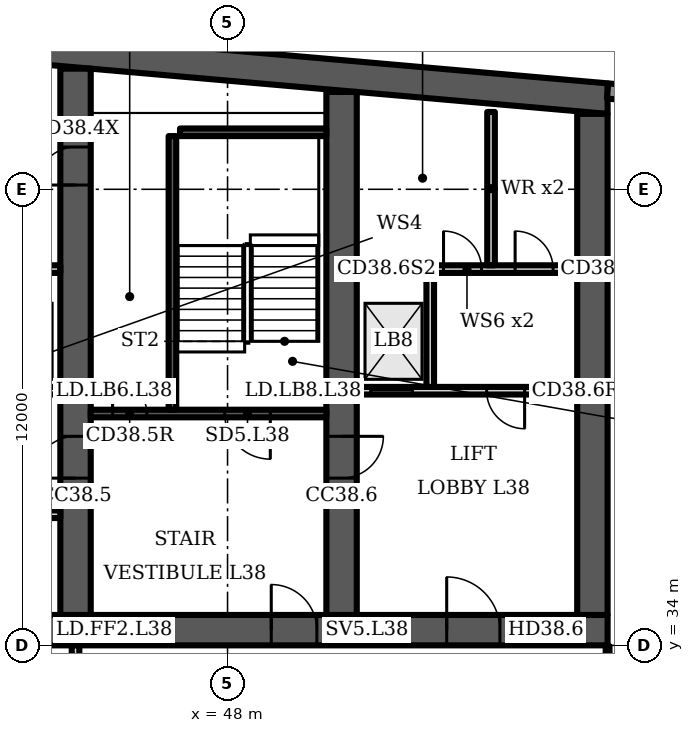
"""IFC4 building model, lengths in metres.
Left out: names, types, materials, properties, quantities, classifications, styles, units other than length and angle.
Written with IfcOpenShell. Run it as: python <this file> out.ifc"""

import sys

from ifc_helpers import new_model, si_unit, direction, frame, frame_2d, origin, place, context, subcontext, project, spatial, polyline, rectangle, outline, extrude, element, fill, save


model = new_model("IFC4")
c1 = context("Model", 3, precision=1e-05, world=origin(), true_north=direction((0.0, 1.0)))
c2 = subcontext(c1, "Body", "Model", "MODEL_VIEW")
j1 = project(units=[si_unit("LENGTHUNIT", "METRE"), si_unit("PLANEANGLEUNIT", "RADIAN")], contexts=[c1])
p1 = place(None, origin())
s1 = spatial("IfcSite", under=j1, at=p1, CompositionType="ELEMENT")
p2 = place(p1, origin())
s2 = spatial("IfcBuilding", under=s1, at=p2, CompositionType="ELEMENT")
p3 = place(p2, frame((0.0, 0.0, 159.1)))
s3 = spatial("IfcBuildingStorey", under=s2, at=p3, CompositionType="ELEMENT", Elevation=159.1)
p4 = place(p3, frame((0.0, 0.0, -0.0)))
e1 = element("IfcWall", 1, at=p4, inside=s3, PredefinedType="SHEAR", context=c2, shape_type="SweptSolid", body=[
    extrude(outline(polyline([(16.0, 47.984), (37.0, 49.822), (58.0, 47.984), (58.0, 48.787), (37.0, 50.625), (16.0, 48.787), (16.0, 47.984)])), origin(), (0.0, 0.0, 1.0), 3.6),
])
p5 = place(p3, frame((16.0, 34.4, 0.0), z_axis=(0.0, 0.0, 1.0), x_axis=(1.0, 0.0, 0.0)))
e2 = element("IfcWall", 2, at=p5, inside=s3, PredefinedType="SHEAR", context=c2, shape_type="SweptSolid", body=[
    extrude(rectangle(XDim=42.0, YDim=0.8, at=frame_2d((21.0, 0.0))), origin(), (0.0, 0.0, 1.0), 3.6),
])
p6 = place(p5, frame((3.2, 0.0, 0.0)))
e3 = element("IfcOpeningElement", 3, at=p6, cuts=e2, PredefinedType="OPENING", context=c2, shape_type="SweptSolid", body=[
    extrude(rectangle(XDim=1.0, YDim=2.1, at=frame_2d((0.5, 1.05))), frame((0.0, 0.41, 0.0), z_axis=(0.0, -1.0, 0.0), x_axis=(1.0, 0.0, 0.0)), (0.0, 0.0, 1.0), 0.82),
])
p7 = place(p5, frame((7.65, 0.0, 0.0)))
e4 = element("IfcOpeningElement", 4, at=p7, cuts=e2, PredefinedType="OPENING", context=c2, shape_type="SweptSolid", body=[
    extrude(rectangle(XDim=1.2, YDim=2.1, at=frame_2d((0.6, 1.05))), frame((0.0, 0.41, 0.0), z_axis=(0.0, -1.0, 0.0), x_axis=(1.0, 0.0, 0.0)), (0.0, 0.0, 1.0), 0.82),
])
p8 = place(p5, frame((14.767, 0.0, 0.0)))
e5 = element("IfcOpeningElement", 5, at=p8, cuts=e2, PredefinedType="OPENING", context=c2, shape_type="SweptSolid", body=[
    extrude(rectangle(XDim=1.1, YDim=2.1, at=frame_2d((0.55, 1.05))), frame((0.0, 0.41, 0.0), z_axis=(0.0, -1.0, 0.0), x_axis=(1.0, 0.0, 0.0)), (0.0, 0.0, 1.0), 0.82),
])
p9 = place(p5, frame((19.133, 0.0, 0.0)))
e6 = element("IfcOpeningElement", 6, at=p9, cuts=e2, PredefinedType="OPENING", context=c2, shape_type="SweptSolid", body=[
    extrude(rectangle(XDim=1.1, YDim=2.1, at=frame_2d((0.55, 1.05))), frame((0.0, 0.41, 0.0), z_axis=(0.0, -1.0, 0.0), x_axis=(1.0, 0.0, 0.0)), (0.0, 0.0, 1.0), 0.82),
])
p10 = place(p5, frame((16.8, 0.0, 0.0)))
e7 = element("IfcOpeningElement", 7, at=p10, cuts=e2, PredefinedType="OPENING", context=c2, shape_type="SweptSolid", body=[
    extrude(rectangle(XDim=1.4, YDim=2.1, at=frame_2d((0.7, 1.05))), frame((0.0, 0.41, 0.0), z_axis=(0.0, -1.0, 0.0), x_axis=(1.0, 0.0, 0.0)), (0.0, 0.0, 1.0), 0.82),
])
p11 = place(p5, frame((21.767, 0.0, 0.0)))
e8 = element("IfcOpeningElement", 8, at=p11, cuts=e2, PredefinedType="OPENING", context=c2, shape_type="SweptSolid", body=[
    extrude(rectangle(XDim=1.1, YDim=2.1, at=frame_2d((0.55, 1.05))), frame((0.0, 0.41, 0.0), z_axis=(0.0, -1.0, 0.0), x_axis=(1.0, 0.0, 0.0)), (0.0, 0.0, 1.0), 0.82),
])
p12 = place(p5, frame((23.95, 0.0, 0.0)))
e9 = element("IfcOpeningElement", 9, at=p12, cuts=e2, PredefinedType="OPENING", context=c2, shape_type="SweptSolid", body=[
    extrude(rectangle(XDim=1.1, YDim=2.1, at=frame_2d((0.55, 1.05))), frame((0.0, 0.41, 0.0), z_axis=(0.0, -1.0, 0.0), x_axis=(1.0, 0.0, 0.0)), (0.0, 0.0, 1.0), 0.82),
])
p13 = place(p5, frame((26.133, 0.0, 0.0)))
e10 = element("IfcOpeningElement", 10, at=p13, cuts=e2, PredefinedType="OPENING", context=c2, shape_type="SweptSolid", body=[
    extrude(rectangle(XDim=1.1, YDim=2.1, at=frame_2d((0.55, 1.05))), frame((0.0, 0.41, 0.0), z_axis=(0.0, -1.0, 0.0), x_axis=(1.0, 0.0, 0.0)), (0.0, 0.0, 1.0), 0.82),
])
p14 = place(p5, frame((33.15, 0.0, 0.0)))
e11 = element("IfcOpeningElement", 11, at=p14, cuts=e2, PredefinedType="OPENING", context=c2, shape_type="SweptSolid", body=[
    extrude(rectangle(XDim=1.2, YDim=2.1, at=frame_2d((0.6, 1.05))), frame((0.0, 0.41, 0.0), z_axis=(0.0, -1.0, 0.0), x_axis=(1.0, 0.0, 0.0)), (0.0, 0.0, 1.0), 0.82),
])
p15 = place(p5, frame((37.767, 0.0, 0.0)))
e12 = element("IfcOpeningElement", 12, at=p15, cuts=e2, PredefinedType="OPENING", context=c2, shape_type="SweptSolid", body=[
    extrude(rectangle(XDim=1.4, YDim=2.1, at=frame_2d((0.7, 1.05))), frame((0.0, 0.41, 0.0), z_axis=(0.0, -1.0, 0.0), x_axis=(1.0, 0.0, 0.0)), (0.0, 0.0, 1.0), 0.82),
])
p16 = place(p3, frame((44.0, 34.8, 0.0), z_axis=(0.0, 0.0, 1.0), x_axis=(0.0, 1.0, 0.0)))
e13 = element("IfcWall", 13, at=p16, inside=s3, PredefinedType="SHEAR", context=c2, shape_type="SweptSolid", body=[
    extrude(rectangle(XDim=14.374, YDim=0.8, at=frame_2d((7.187, 0.0))), origin(), (0.0, 0.0, 1.0), 3.6),
])
p17 = place(p16, frame((11.312, 0.0, 0.0)))
e14 = element("IfcOpeningElement", 14, at=p17, cuts=e13, PredefinedType="OPENING", context=c2, shape_type="SweptSolid", body=[
    extrude(rectangle(XDim=1.0, YDim=2.1, at=frame_2d((0.5, 1.05))), frame((0.0, 0.41, 0.0), z_axis=(0.0, -1.0, 0.0), x_axis=(1.0, 0.0, 0.0)), (0.0, 0.0, 1.0), 0.82),
])
p18 = place(p16, frame((3.6, 0.0, 0.0)))
e15 = element("IfcOpeningElement", 15, at=p18, cuts=e13, PredefinedType="OPENING", context=c2, shape_type="SweptSolid", body=[
    extrude(rectangle(XDim=1.1, YDim=2.1, at=frame_2d((0.55, 1.05))), frame((0.0, 0.41, 0.0), z_axis=(0.0, -1.0, 0.0), x_axis=(1.0, 0.0, 0.0)), (0.0, 0.0, 1.0), 0.82),
])
p19 = place(p3, frame((51.0, 34.8, 0.0), z_axis=(0.0, 0.0, 1.0), x_axis=(0.0, 1.0, 0.0)))
e16 = element("IfcWall", 16, at=p19, inside=s3, PredefinedType="SHEAR", context=c2, shape_type="SweptSolid", body=[
    extrude(rectangle(XDim=13.762, YDim=0.8, at=frame_2d((6.881, 0.0))), origin(), (0.0, 0.0, 1.0), 3.6),
])
p20 = place(p19, frame((3.6, 0.0, 0.0)))
e17 = element("IfcOpeningElement", 17, at=p20, cuts=e16, PredefinedType="OPENING", context=c2, shape_type="SweptSolid", body=[
    extrude(rectangle(XDim=1.1, YDim=2.1, at=frame_2d((0.55, 1.05))), frame((0.0, 0.41, 0.0), z_axis=(0.0, -1.0, 0.0), x_axis=(1.0, 0.0, 0.0)), (0.0, 0.0, 1.0), 0.82),
])
p21 = place(p3, frame((57.6, 34.8, 0.0), z_axis=(0.0, 0.0, 1.0), x_axis=(0.0, 1.0, 0.0)))
e18 = element("IfcWall", 18, at=p21, inside=s3, PredefinedType="SHEAR", context=c2, shape_type="SweptSolid", body=[
    extrude(rectangle(XDim=13.184, YDim=0.8, at=frame_2d((6.592, 0.0))), origin(), (0.0, 0.0, 1.0), 3.6),
])
p22 = place(p3, frame((60.983, 48.326, 0.0), z_axis=(0.0, 0.0, 1.0), x_axis=(-0.996194, 0.087168, 0.0)))
e19 = element("IfcWall", 19, at=p22, inside=s3, PredefinedType="SOLIDWALL", context=c2, shape_type="SweptSolid", body=[
    extrude(rectangle(XDim=2.994, YDim=0.4, at=frame_2d((1.497, 0.0))), origin(), (0.0, 0.0, 1.0), 3.2),
])
p23 = place(p3, frame((37.4, 40.7, 0.0), z_axis=(0.0, 0.0, 1.0), x_axis=(1.0, 0.0, 0.0)))
e20 = element("IfcWall", 20, at=p23, inside=s3, PredefinedType="PARTITIONING", context=c2, shape_type="SweptSolid", body=[
    extrude(rectangle(XDim=6.2, YDim=0.2, at=frame_2d((3.1, 0.0))), origin(), (0.0, 0.0, 1.0), 3.2),
])
p24 = place(p23, frame((0.367, 0.0, 0.0)))
e21 = element("IfcOpeningElement", 21, at=p24, cuts=e20, PredefinedType="OPENING", context=c2, shape_type="SweptSolid", body=[
    extrude(rectangle(XDim=1.1, YDim=2.1, at=frame_2d((0.55, 1.05))), frame((0.0, 0.11, 0.0), z_axis=(0.0, -1.0, 0.0), x_axis=(1.0, 0.0, 0.0)), (0.0, 0.0, 1.0), 0.22),
])
p25 = place(p23, frame((2.55, 0.0, 0.0)))
e22 = element("IfcOpeningElement", 22, at=p25, cuts=e20, PredefinedType="OPENING", context=c2, shape_type="SweptSolid", body=[
    extrude(rectangle(XDim=1.1, YDim=2.1, at=frame_2d((0.55, 1.05))), frame((0.0, 0.11, 0.0), z_axis=(0.0, -1.0, 0.0), x_axis=(1.0, 0.0, 0.0)), (0.0, 0.0, 1.0), 0.22),
])
p26 = place(p23, frame((4.733, 0.0, 0.0)))
e23 = element("IfcOpeningElement", 23, at=p26, cuts=e20, PredefinedType="OPENING", context=c2, shape_type="SweptSolid", body=[
    extrude(rectangle(XDim=1.1, YDim=2.1, at=frame_2d((0.55, 1.05))), frame((0.0, 0.11, 0.0), z_axis=(0.0, -1.0, 0.0), x_axis=(1.0, 0.0, 0.0)), (0.0, 0.0, 1.0), 0.22),
])
p27 = place(p3, frame((0.0, 0.0, -0.0)))
e24 = element("IfcWall", 24, at=p27, inside=s3, PredefinedType="PARTITIONING", context=c2, shape_type="SweptSolid", body=[
    extrude(outline(polyline([(41.567, 37.1), (39.433, 37.1), (39.433, 34.8), (39.233, 34.8), (39.233, 37.65), (37.4, 37.65), (37.4, 37.85), (39.233, 37.85), (39.433, 37.85), (39.433, 37.3), (41.567, 37.3), (41.567, 37.55), (41.767, 37.55), (43.6, 37.55), (43.6, 37.35), (41.767, 37.35), (41.767, 34.8), (41.567, 34.8), (41.567, 37.1)])), origin(), (0.0, 0.0, 1.0), 3.2),
])
p28 = place(p3, frame((0.0, 0.0, -0.0)))
e25 = element("IfcWall", 25, at=p28, inside=s3, PredefinedType="PARTITIONING", context=c2, shape_type="SweptSolid", body=[
    extrude(outline(polyline([(39.433, 40.8), (39.233, 40.8), (39.233, 43.8), (37.4, 43.8), (37.4, 44.0), (43.6, 44.0), (43.6, 43.8), (41.767, 43.8), (41.767, 40.8), (41.567, 40.8), (41.567, 43.8), (39.433, 43.8), (39.433, 40.8)])), origin(), (0.0, 0.0, 1.0), 3.2),
])
p29 = place(p3, frame((44.4, 40.1, 0.0), z_axis=(0.0, 0.0, 1.0), x_axis=(1.0, 0.0, 0.0)))
e26 = element("IfcWall", 26, at=p29, inside=s3, PredefinedType="SHEAR", context=c2, shape_type="SweptSolid", body=[
    extrude(rectangle(XDim=6.2, YDim=0.2, at=frame_2d((3.1, 0.0))), origin(), (0.0, 0.0, 1.0), 3.2),
])
p30 = place(p29, frame((3.525, 0.0, 0.0)))
e27 = element("IfcOpeningElement", 27, at=p30, cuts=e26, PredefinedType="OPENING", context=c2, shape_type="SweptSolid", body=[
    extrude(rectangle(XDim=1.2, YDim=2.1, at=frame_2d((0.6, 1.05))), frame((0.0, 0.11, 0.0), z_axis=(0.0, -1.0, 0.0), x_axis=(1.0, 0.0, 0.0)), (0.0, 0.0, 1.0), 0.22),
])
p31 = place(p29, frame((0.575, 0.0, 0.0)))
e28 = element("IfcOpeningElement", 28, at=p31, cuts=e26, PredefinedType="OPENING", context=c2, shape_type="SweptSolid", body=[
    extrude(rectangle(XDim=0.9, YDim=2.1, at=frame_2d((0.45, 1.05))), frame((0.0, 0.11, 0.0), z_axis=(0.0, -1.0, 0.0), x_axis=(1.0, 0.0, 0.0)), (0.0, 0.0, 1.0), 0.22),
])
p32 = place(p3, frame((46.55, 40.2, 0.0), z_axis=(0.0, 0.0, 1.0), x_axis=(0.0, 1.0, 0.0)))
e29 = element("IfcWall", 29, at=p32, inside=s3, PredefinedType="SHEAR", context=c2, shape_type="SweptSolid", body=[
    extrude(rectangle(XDim=7.2, YDim=0.2, at=frame_2d((3.6, 0.0))), origin(), (0.0, 0.0, 1.0), 3.2),
])
p33 = place(p3, frame((46.75, 47.5, 0.0), z_axis=(0.0, 0.0, 1.0), x_axis=(1.0, 0.0, 0.0)))
e30 = element("IfcWall", 30, at=p33, inside=s3, PredefinedType="SHEAR", context=c2, shape_type="SweptSolid", body=[
    extrude(rectangle(XDim=3.85, YDim=0.2, at=frame_2d((1.925, 0.0))), origin(), (0.0, 0.0, 1.0), 3.2),
])
p34 = place(p3, frame((51.4, 40.7, 0.0), z_axis=(0.0, 0.0, 1.0), x_axis=(1.0, 0.0, 0.0)))
e31 = element("IfcWall", 31, at=p34, inside=s3, PredefinedType="PARTITIONING", context=c2, shape_type="SweptSolid", body=[
    extrude(rectangle(XDim=5.8, YDim=0.2, at=frame_2d((2.9, 0.0))), origin(), (0.0, 0.0, 1.0), 3.2),
])
p35 = place(p34, frame((0.367, 0.0, 0.0)))
e32 = element("IfcOpeningElement", 32, at=p35, cuts=e31, PredefinedType="OPENING", context=c2, shape_type="SweptSolid", body=[
    extrude(rectangle(XDim=1.1, YDim=2.1, at=frame_2d((0.55, 1.05))), frame((0.0, 0.11, 0.0), z_axis=(0.0, -1.0, 0.0), x_axis=(1.0, 0.0, 0.0)), (0.0, 0.0, 1.0), 0.22),
])
p36 = place(p34, frame((3.417, 0.0, 0.0)))
e33 = element("IfcOpeningElement", 33, at=p36, cuts=e31, PredefinedType="OPENING", context=c2, shape_type="SweptSolid", body=[
    extrude(rectangle(XDim=1.0, YDim=2.1, at=frame_2d((0.5, 1.05))), frame((0.0, 0.11, 0.0), z_axis=(0.0, -1.0, 0.0), x_axis=(1.0, 0.0, 0.0)), (0.0, 0.0, 1.0), 0.22),
])
p37 = place(p3, frame((51.4, 43.9, 0.0), z_axis=(0.0, 0.0, 1.0), x_axis=(1.0, 0.0, 0.0)))
e34 = element("IfcWall", 34, at=p37, inside=s3, PredefinedType="PARTITIONING", context=c2, shape_type="SweptSolid", body=[
    extrude(rectangle(XDim=5.8, YDim=0.2, at=frame_2d((2.9, 0.0))), origin(), (0.0, 0.0, 1.0), 3.2),
])
p38 = place(p37, frame((2.283, 0.0, 0.0)))
e35 = element("IfcOpeningElement", 35, at=p38, cuts=e34, PredefinedType="OPENING", context=c2, shape_type="SweptSolid", body=[
    extrude(rectangle(XDim=1.0, YDim=2.1, at=frame_2d((0.5, 1.05))), frame((0.0, 0.11, 0.0), z_axis=(0.0, -1.0, 0.0), x_axis=(1.0, 0.0, 0.0)), (0.0, 0.0, 1.0), 0.22),
])
p39 = place(p37, frame((4.167, 0.0, 0.0)))
e36 = element("IfcOpeningElement", 36, at=p39, cuts=e34, PredefinedType="OPENING", context=c2, shape_type="SweptSolid", body=[
    extrude(rectangle(XDim=1.0, YDim=2.1, at=frame_2d((0.5, 1.05))), frame((0.0, 0.11, 0.0), z_axis=(0.0, -1.0, 0.0), x_axis=(1.0, 0.0, 0.0)), (0.0, 0.0, 1.0), 0.22),
])
p40 = place(p3, frame((0.0, 0.0, -0.0)))
e37 = element("IfcWall", 37, at=p40, inside=s3, PredefinedType="PARTITIONING", context=c2, shape_type="SweptSolid", body=[
    extrude(outline(polyline([(53.433, 40.8), (53.433, 43.8), (53.233, 43.8), (53.233, 40.8), (53.433, 40.8)])), origin(), (0.0, 0.0, 1.0), 3.2),
])
p41 = place(p3, frame((54.933, 44.0, 0.0), z_axis=(0.0, 0.0, 1.0), x_axis=(0.0, 1.0, 0.0)))
e38 = element("IfcWall", 38, at=p41, inside=s3, PredefinedType="PARTITIONING", context=c2, shape_type="SweptSolid", body=[
    extrude(rectangle(XDim=4.034, YDim=0.2, at=frame_2d((2.017, 0.0))), origin(), (0.0, 0.0, 1.0), 3.2),
])
p42 = place(p3, frame((44.0, 30.5, 0.0), z_axis=(0.0, 0.0, 1.0), x_axis=(0.0, 1.0, 0.0)))
e39 = element("IfcWall", 39, at=p42, inside=s3, PredefinedType="PARTITIONING", context=c2, shape_type="SweptSolid", body=[
    extrude(rectangle(XDim=3.5, YDim=0.2, at=frame_2d((1.75, 0.0))), origin(), (0.0, 0.0, 1.0), 3.2),
])
p43 = place(p42, frame((1.2, 0.0, 0.0)))
e40 = element("IfcOpeningElement", 40, at=p43, cuts=e39, PredefinedType="OPENING", context=c2, shape_type="SweptSolid", body=[
    extrude(rectangle(XDim=1.1, YDim=2.1, at=frame_2d((0.55, 1.05))), frame((0.0, 0.11, 0.0), z_axis=(0.0, -1.0, 0.0), x_axis=(1.0, 0.0, 0.0)), (0.0, 0.0, 1.0), 0.22),
])
p44 = place(p3, frame((58.0, 30.5, 0.0), z_axis=(0.0, 0.0, 1.0), x_axis=(0.0, 1.0, 0.0)))
e41 = element("IfcWall", 41, at=p44, inside=s3, PredefinedType="PARTITIONING", context=c2, shape_type="SweptSolid", body=[
    extrude(rectangle(XDim=3.48, YDim=0.1, at=frame_2d((1.74, 0.0))), origin(), (0.0, 0.0, 1.0), 3.2),
])
p45 = place(p17, origin())
e42 = element("IfcDoor", 42, at=p45, inside=s3, OperationType="SINGLE_SWING_LEFT", PredefinedType="DOOR", context=c2, shape_type="SweptSolid", body=[
    extrude(rectangle(XDim=1.0, YDim=2.1, at=frame_2d((0.5, 1.05))), frame((0.0, 0.4, 0.0), z_axis=(0.0, -1.0, 0.0), x_axis=(1.0, 0.0, 0.0)), (0.0, 0.0, 1.0), 0.8),
])
fill(e14, e42)
p46 = place(p30, origin())
e43 = element("IfcDoor", 43, at=p46, inside=s3, OperationType="SINGLE_SWING_RIGHT", PredefinedType="DOOR", context=c2, shape_type="SweptSolid", body=[
    extrude(rectangle(XDim=1.2, YDim=2.1, at=frame_2d((0.6, 1.05))), frame((0.0, 0.025, 0.0), z_axis=(0.0, -1.0, 0.0), x_axis=(1.0, 0.0, 0.0)), (0.0, 0.0, 1.0), 0.05),
])
fill(e27, e43)
p47 = place(p31, origin())
e44 = element("IfcDoor", 44, at=p47, inside=s3, OperationType="SINGLE_SWING_LEFT", PredefinedType="DOOR", context=c2, shape_type="SweptSolid", body=[
    extrude(rectangle(XDim=0.9, YDim=2.1, at=frame_2d((0.45, 1.05))), frame((0.0, 0.025, 0.0), z_axis=(0.0, -1.0, 0.0), x_axis=(1.0, 0.0, 0.0)), (0.0, 0.0, 1.0), 0.05),
])
fill(e28, e44)
p48 = place(p14, origin())
e45 = element("IfcDoor", 45, at=p48, inside=s3, OperationType="SINGLE_SWING_LEFT", PredefinedType="DOOR", context=c2, shape_type="SweptSolid", body=[
    extrude(rectangle(XDim=1.2, YDim=2.1, at=frame_2d((0.6, 1.05))), frame((0.0, 0.025, 0.0), z_axis=(0.0, -1.0, 0.0), x_axis=(1.0, 0.0, 0.0)), (0.0, 0.0, 1.0), 0.05),
])
fill(e11, e45)
p49 = place(p15, origin())
e46 = element("IfcDoor", 46, at=p49, inside=s3, OperationType="DOUBLE_DOOR_SINGLE_SWING", PredefinedType="DOOR", context=c2, shape_type="SweptSolid", body=[
    extrude(rectangle(XDim=1.4, YDim=2.1, at=frame_2d((0.7, 1.05))), frame((0.0, 0.025, 0.0), z_axis=(0.0, -1.0, 0.0), x_axis=(1.0, 0.0, 0.0)), (0.0, 0.0, 1.0), 0.05),
])
fill(e12, e46)
p50 = place(p35, origin())
e47 = element("IfcDoor", 47, at=p50, inside=s3, OperationType="DOUBLE_DOOR_SLIDING", PredefinedType="DOOR", context=c2, shape_type="SweptSolid", body=[
    extrude(rectangle(XDim=1.1, YDim=2.1, at=frame_2d((0.55, 1.05))), frame((0.0, 0.025, 0.0), z_axis=(0.0, -1.0, 0.0), x_axis=(1.0, 0.0, 0.0)), (0.0, 0.0, 1.0), 0.05),
])
fill(e32, e47)
p51 = place(p36, origin())
e48 = element("IfcDoor", 48, at=p51, inside=s3, OperationType="SINGLE_SWING_RIGHT", PredefinedType="DOOR", context=c2, shape_type="SweptSolid", body=[
    extrude(rectangle(XDim=1.0, YDim=2.1, at=frame_2d((0.5, 1.05))), frame((0.0, 0.025, 0.0), z_axis=(0.0, -1.0, 0.0), x_axis=(1.0, 0.0, 0.0)), (0.0, 0.0, 1.0), 0.05),
])
fill(e33, e48)
p52 = place(p38, origin())
e49 = element("IfcDoor", 49, at=p52, inside=s3, OperationType="SINGLE_SWING_LEFT", PredefinedType="DOOR", context=c2, shape_type="SweptSolid", body=[
    extrude(rectangle(XDim=1.0, YDim=2.1, at=frame_2d((0.5, 1.05))), frame((0.0, 0.025, 0.0), z_axis=(0.0, -1.0, 0.0), x_axis=(1.0, 0.0, 0.0)), (0.0, 0.0, 1.0), 0.05),
])
fill(e35, e49)
p53 = place(p39, origin())
e50 = element("IfcDoor", 50, at=p53, inside=s3, OperationType="SINGLE_SWING_LEFT", PredefinedType="DOOR", context=c2, shape_type="SweptSolid", body=[
    extrude(rectangle(XDim=1.0, YDim=2.1, at=frame_2d((0.5, 1.05))), frame((0.0, 0.025, 0.0), z_axis=(0.0, -1.0, 0.0), x_axis=(1.0, 0.0, 0.0)), (0.0, 0.0, 1.0), 0.05),
])
fill(e36, e50)
p54 = place(p18, origin())
e51 = element("IfcDoor", 51, at=p54, inside=s3, OperationType="SINGLE_SWING_LEFT", PredefinedType="DOOR", context=c2, shape_type="SweptSolid", body=[
    extrude(rectangle(XDim=1.1, YDim=2.1, at=frame_2d((0.55, 1.05))), frame((0.0, 0.025, 0.0), z_axis=(0.0, -1.0, 0.0), x_axis=(1.0, 0.0, 0.0)), (0.0, 0.0, 1.0), 0.05),
])
fill(e15, e51)
p55 = place(p20, origin())
e52 = element("IfcDoor", 52, at=p55, inside=s3, OperationType="SINGLE_SWING_RIGHT", PredefinedType="DOOR", context=c2, shape_type="SweptSolid", body=[
    extrude(rectangle(XDim=1.1, YDim=2.1, at=frame_2d((0.55, 1.05))), frame((0.0, 0.025, 0.0), z_axis=(0.0, -1.0, 0.0), x_axis=(1.0, 0.0, 0.0)), (0.0, 0.0, 1.0), 0.05),
])
fill(e17, e52)
save(model, sys.argv[1])
